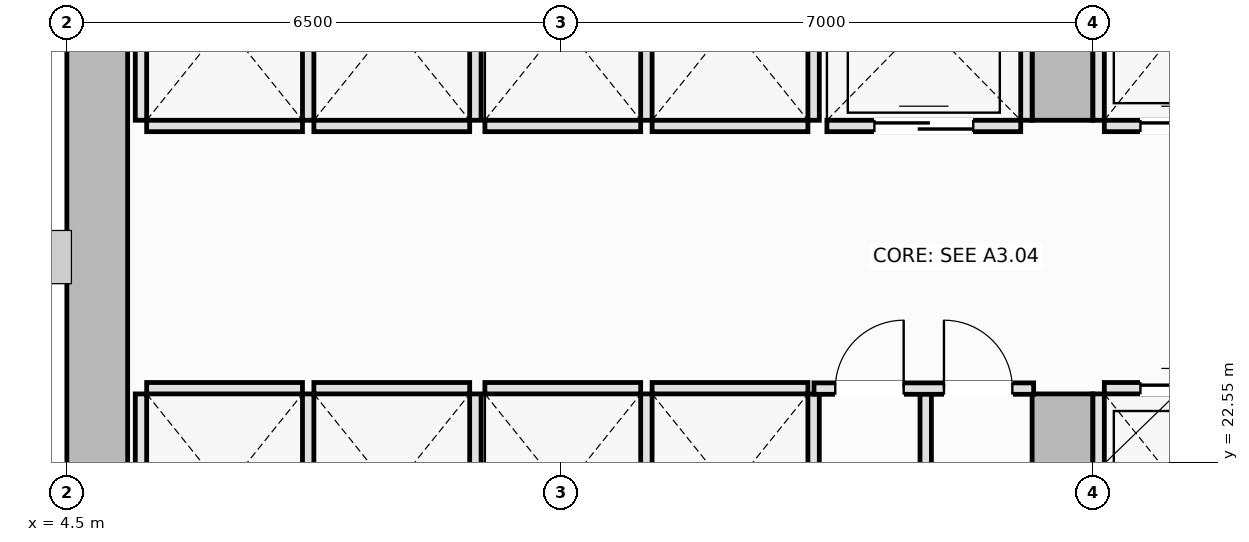
"""IFC4 building model, lengths in metres.
Left out: names, types, materials, properties, quantities, classifications, styles, units other than length and angle.
Written with IfcOpenShell. Run it as: python <this file> out.ifc"""

import sys

from ifc_helpers import new_model, si_unit, direction, frame, frame_2d, origin, place, context, subcontext, project, spatial, rectangle, extrude, element, fill, save


model = new_model("IFC4")
c1 = context("Model", 3, precision=1e-05, world=origin(), true_north=direction((0.0, 1.0)))
c2 = subcontext(c1, "Body", "Model", "MODEL_VIEW")
j1 = project(units=[si_unit("LENGTHUNIT", "METRE"), si_unit("PLANEANGLEUNIT", "RADIAN")], contexts=[c1])
p1 = place(None, origin())
s1 = spatial("IfcSite", under=j1, at=p1, CompositionType="ELEMENT")
p2 = place(p1, origin())
s2 = spatial("IfcBuilding", under=s1, at=p2, CompositionType="ELEMENT")
p3 = place(p2, frame((0.0, 0.0, 68.2)))
s3 = spatial("IfcBuildingStorey", under=s2, at=p3, CompositionType="ELEMENT", Elevation=68.2)
p4 = place(p3, frame((4.9, 14.8, 0.0), z_axis=(0.0, 0.0, 1.0), x_axis=(0.0, 1.0, 0.0)))
e1 = element("IfcWall", 1, at=p4, inside=s3, PredefinedType="SHEAR", context=c2, shape_type="SweptSolid", body=[
    extrude(rectangle(XDim=20.9, YDim=0.8, at=frame_2d((10.45, 0.0))), origin(), (0.0, 0.0, 1.0), 3.55),
])
p5 = place(p3, frame((17.6, 14.8, 0.0), z_axis=(0.0, 0.0, 1.0), x_axis=(0.0, 1.0, 0.0)))
e2 = element("IfcWall", 2, at=p5, inside=s3, PredefinedType="SHEAR", context=c2, shape_type="SweptSolid", body=[
    extrude(rectangle(XDim=8.65, YDim=0.8, at=frame_2d((4.325, 0.0))), origin(), (0.0, 0.0, 1.0), 3.55),
])
p6 = place(p5, frame((4.1, 0.0, 0.0)))
e3 = element("IfcOpeningElement", 3, at=p6, cuts=e2, PredefinedType="OPENING", context=c2, shape_type="SweptSolid", body=[
    extrude(rectangle(XDim=1.1, YDim=2.15, at=frame_2d((0.55, 1.075))), frame((0.0, 0.41, 0.0), z_axis=(0.0, -1.0, 0.0), x_axis=(1.0, 0.0, 0.0)), (0.0, 0.0, 1.0), 0.82),
])
p7 = place(p3, frame((17.6, 27.05, 0.0), z_axis=(0.0, 0.0, 1.0), x_axis=(0.0, 1.0, 0.0)))
e4 = element("IfcWall", 4, at=p7, inside=s3, PredefinedType="SHEAR", context=c2, shape_type="SweptSolid", body=[
    extrude(rectangle(XDim=8.65, YDim=0.8, at=frame_2d((4.325, 0.0))), origin(), (0.0, 0.0, 1.0), 3.55),
])
p8 = place(p7, frame((3.45, 0.0, 0.0)))
e5 = element("IfcOpeningElement", 5, at=p8, cuts=e4, PredefinedType="OPENING", context=c2, shape_type="SweptSolid", body=[
    extrude(rectangle(XDim=1.1, YDim=2.15, at=frame_2d((0.55, 1.075))), frame((0.0, 0.41, 0.0), z_axis=(0.0, -1.0, 0.0), x_axis=(1.0, 0.0, 0.0)), (0.0, 0.0, 1.0), 0.82),
])
p9 = place(p3, frame((18.15, 23.525, 0.0), z_axis=(0.0, 0.0, 1.0), x_axis=(1.0, 0.0, 0.0)))
e6 = element("IfcWall", 6, at=p9, inside=s3, PredefinedType="PARTITIONING", context=c2, shape_type="SweptSolid", body=[
    extrude(rectangle(XDim=2.05, YDim=0.15, at=frame_2d((1.025, 0.0))), origin(), (0.0, 0.0, 1.0), 3.37),
])
p10 = place(p9, frame((0.475, 0.0, 0.0)))
e7 = element("IfcOpeningElement", 7, at=p10, cuts=e6, PredefinedType="OPENING", context=c2, shape_type="SweptSolid", body=[
    extrude(rectangle(XDim=1.1, YDim=2.2, at=frame_2d((0.55, 1.1))), frame((0.0, 0.085, 0.0), z_axis=(0.0, -1.0, 0.0), x_axis=(1.0, 0.0, 0.0)), (0.0, 0.0, 1.0), 0.17),
])
p11 = place(p3, frame((18.075, 20.9, 0.0), z_axis=(0.0, 0.0, 1.0), x_axis=(0.0, 1.0, 0.0)))
e8 = element("IfcWall", 8, at=p11, inside=s3, PredefinedType="PARTITIONING", context=c2, shape_type="SweptSolid", body=[
    extrude(rectangle(XDim=2.55, YDim=0.15, at=frame_2d((1.275, 0.0))), origin(), (0.0, 0.0, 1.0), 3.37),
])
p12 = place(p3, frame((18.15, 26.975, 0.0), z_axis=(0.0, 0.0, 1.0), x_axis=(1.0, 0.0, 0.0)))
e9 = element("IfcWall", 9, at=p12, inside=s3, PredefinedType="PARTITIONING", context=c2, shape_type="SweptSolid", body=[
    extrude(rectangle(XDim=2.05, YDim=0.15, at=frame_2d((1.025, 0.0))), origin(), (0.0, 0.0, 1.0), 3.37),
])
p13 = place(p12, frame((0.475, 0.0, 0.0)))
e10 = element("IfcOpeningElement", 10, at=p13, cuts=e9, PredefinedType="OPENING", context=c2, shape_type="SweptSolid", body=[
    extrude(rectangle(XDim=1.1, YDim=2.2, at=frame_2d((0.55, 1.1))), frame((0.0, 0.085, 0.0), z_axis=(0.0, -1.0, 0.0), x_axis=(1.0, 0.0, 0.0)), (0.0, 0.0, 1.0), 0.17),
])
p14 = place(p3, frame((18.075, 27.05, 0.0), z_axis=(0.0, 0.0, 1.0), x_axis=(0.0, 1.0, 0.0)))
e11 = element("IfcWall", 11, at=p14, inside=s3, PredefinedType="PARTITIONING", context=c2, shape_type="SweptSolid", body=[
    extrude(rectangle(XDim=2.55, YDim=0.15, at=frame_2d((1.275, 0.0))), origin(), (0.0, 0.0, 1.0), 3.37),
])
p15 = place(p3, frame((5.55, 23.525, 0.0), z_axis=(0.0, 0.0, 1.0), x_axis=(1.0, 0.0, 0.0)))
e12 = element("IfcWall", 12, at=p15, inside=s3, PredefinedType="PARTITIONING", context=c2, shape_type="SweptSolid", body=[
    extrude(rectangle(XDim=2.05, YDim=0.15, at=frame_2d((1.025, 0.0))), origin(), (0.0, 0.0, 1.0), 3.37),
])
for number, where, z_axis, x_axis in (
    (13, (5.475, 20.9, 0.0), (0.0, 0.0, 1.0), (0.0, 1.0, 0.0)),
    (14, (7.675, 20.9, 0.0), (0.0, 0.0, 1.0), (0.0, 1.0, 0.0)),
):
    element("IfcWall", number, at=place(p3, frame(where, z_axis=z_axis, x_axis=x_axis)), inside=s3, PredefinedType="PARTITIONING", context=c2, shape_type="SweptSolid", body=[
        extrude(rectangle(XDim=2.55, YDim=0.15, at=frame_2d((1.275, 0.0))), origin(), (0.0, 0.0, 1.0), 3.37),
    ])
p16 = place(p3, frame((7.75, 23.525, 0.0), z_axis=(0.0, 0.0, 1.0), x_axis=(1.0, 0.0, 0.0)))
e15 = element("IfcWall", 15, at=p16, inside=s3, PredefinedType="PARTITIONING", context=c2, shape_type="SweptSolid", body=[
    extrude(rectangle(XDim=2.05, YDim=0.15, at=frame_2d((1.025, 0.0))), origin(), (0.0, 0.0, 1.0), 3.37),
])
p17 = place(p3, frame((9.875, 20.9, 0.0), z_axis=(0.0, 0.0, 1.0), x_axis=(0.0, 1.0, 0.0)))
e16 = element("IfcWall", 16, at=p17, inside=s3, PredefinedType="PARTITIONING", context=c2, shape_type="SweptSolid", body=[
    extrude(rectangle(XDim=2.55, YDim=0.15, at=frame_2d((1.275, 0.0))), origin(), (0.0, 0.0, 1.0), 3.37),
])
p18 = place(p3, frame((5.55, 26.975, 0.0), z_axis=(0.0, 0.0, 1.0), x_axis=(1.0, 0.0, 0.0)))
e17 = element("IfcWall", 17, at=p18, inside=s3, PredefinedType="PARTITIONING", context=c2, shape_type="SweptSolid", body=[
    extrude(rectangle(XDim=2.05, YDim=0.15, at=frame_2d((1.025, 0.0))), origin(), (0.0, 0.0, 1.0), 3.37),
])
for number, where, z_axis, x_axis in (
    (18, (5.475, 27.05, 0.0), (0.0, 0.0, 1.0), (0.0, 1.0, 0.0)),
    (19, (7.675, 27.05, 0.0), (0.0, 0.0, 1.0), (0.0, 1.0, 0.0)),
):
    element("IfcWall", number, at=place(p3, frame(where, z_axis=z_axis, x_axis=x_axis)), inside=s3, PredefinedType="PARTITIONING", context=c2, shape_type="SweptSolid", body=[
        extrude(rectangle(XDim=2.55, YDim=0.15, at=frame_2d((1.275, 0.0))), origin(), (0.0, 0.0, 1.0), 3.37),
    ])
p19 = place(p3, frame((7.75, 26.975, 0.0), z_axis=(0.0, 0.0, 1.0), x_axis=(1.0, 0.0, 0.0)))
e20 = element("IfcWall", 20, at=p19, inside=s3, PredefinedType="PARTITIONING", context=c2, shape_type="SweptSolid", body=[
    extrude(rectangle(XDim=2.05, YDim=0.15, at=frame_2d((1.025, 0.0))), origin(), (0.0, 0.0, 1.0), 3.37),
])
p20 = place(p3, frame((9.875, 27.05, 0.0), z_axis=(0.0, 0.0, 1.0), x_axis=(0.0, 1.0, 0.0)))
e21 = element("IfcWall", 21, at=p20, inside=s3, PredefinedType="PARTITIONING", context=c2, shape_type="SweptSolid", body=[
    extrude(rectangle(XDim=2.55, YDim=0.15, at=frame_2d((1.275, 0.0))), origin(), (0.0, 0.0, 1.0), 3.37),
])
p21 = place(p3, frame((10.0, 23.525, 0.0), z_axis=(0.0, 0.0, 1.0), x_axis=(1.0, 0.0, 0.0)))
e22 = element("IfcWall", 22, at=p21, inside=s3, PredefinedType="PARTITIONING", context=c2, shape_type="SweptSolid", body=[
    extrude(rectangle(XDim=2.05, YDim=0.15, at=frame_2d((1.025, 0.0))), origin(), (0.0, 0.0, 1.0), 3.37),
])
p22 = place(p3, frame((12.125, 20.9, 0.0), z_axis=(0.0, 0.0, 1.0), x_axis=(0.0, 1.0, 0.0)))
e23 = element("IfcWall", 23, at=p22, inside=s3, PredefinedType="PARTITIONING", context=c2, shape_type="SweptSolid", body=[
    extrude(rectangle(XDim=2.55, YDim=0.15, at=frame_2d((1.275, 0.0))), origin(), (0.0, 0.0, 1.0), 3.37),
])
p23 = place(p3, frame((12.2, 23.525, 0.0), z_axis=(0.0, 0.0, 1.0), x_axis=(1.0, 0.0, 0.0)))
e24 = element("IfcWall", 24, at=p23, inside=s3, PredefinedType="PARTITIONING", context=c2, shape_type="SweptSolid", body=[
    extrude(rectangle(XDim=2.05, YDim=0.15, at=frame_2d((1.025, 0.0))), origin(), (0.0, 0.0, 1.0), 3.37),
])
p24 = place(p3, frame((14.325, 20.9, 0.0), z_axis=(0.0, 0.0, 1.0), x_axis=(0.0, 1.0, 0.0)))
e25 = element("IfcWall", 25, at=p24, inside=s3, PredefinedType="PARTITIONING", context=c2, shape_type="SweptSolid", body=[
    extrude(rectangle(XDim=2.55, YDim=0.15, at=frame_2d((1.275, 0.0))), origin(), (0.0, 0.0, 1.0), 3.37),
])
p25 = place(p3, frame((10.0, 26.975, 0.0), z_axis=(0.0, 0.0, 1.0), x_axis=(1.0, 0.0, 0.0)))
e26 = element("IfcWall", 26, at=p25, inside=s3, PredefinedType="PARTITIONING", context=c2, shape_type="SweptSolid", body=[
    extrude(rectangle(XDim=2.05, YDim=0.15, at=frame_2d((1.025, 0.0))), origin(), (0.0, 0.0, 1.0), 3.37),
])
p26 = place(p3, frame((12.125, 27.05, 0.0), z_axis=(0.0, 0.0, 1.0), x_axis=(0.0, 1.0, 0.0)))
e27 = element("IfcWall", 27, at=p26, inside=s3, PredefinedType="PARTITIONING", context=c2, shape_type="SweptSolid", body=[
    extrude(rectangle(XDim=2.55, YDim=0.15, at=frame_2d((1.275, 0.0))), origin(), (0.0, 0.0, 1.0), 3.37),
])
p27 = place(p3, frame((12.2, 26.975, 0.0), z_axis=(0.0, 0.0, 1.0), x_axis=(1.0, 0.0, 0.0)))
e28 = element("IfcWall", 28, at=p27, inside=s3, PredefinedType="PARTITIONING", context=c2, shape_type="SweptSolid", body=[
    extrude(rectangle(XDim=2.05, YDim=0.15, at=frame_2d((1.025, 0.0))), origin(), (0.0, 0.0, 1.0), 3.37),
])
p28 = place(p3, frame((14.325, 27.05, 0.0), z_axis=(0.0, 0.0, 1.0), x_axis=(0.0, 1.0, 0.0)))
e29 = element("IfcWall", 29, at=p28, inside=s3, PredefinedType="PARTITIONING", context=c2, shape_type="SweptSolid", body=[
    extrude(rectangle(XDim=2.55, YDim=0.15, at=frame_2d((1.275, 0.0))), origin(), (0.0, 0.0, 1.0), 3.37),
])
p29 = place(p3, frame((14.5, 26.975, 0.0), z_axis=(0.0, 0.0, 1.0), x_axis=(1.0, 0.0, 0.0)))
e30 = element("IfcWall", 30, at=p29, inside=s3, PredefinedType="PARTITIONING", context=c2, shape_type="SweptSolid", body=[
    extrude(rectangle(XDim=2.55, YDim=0.15, at=frame_2d((1.275, 0.0))), origin(), (0.0, 0.0, 1.0), 3.37),
])
p30 = place(p29, frame((0.625, 0.0, 0.0)))
e31 = element("IfcOpeningElement", 31, at=p30, cuts=e30, PredefinedType="OPENING", context=c2, shape_type="SweptSolid", body=[
    extrude(rectangle(XDim=1.3, YDim=2.2, at=frame_2d((0.65, 1.1))), frame((0.0, 0.085, 0.0), z_axis=(0.0, -1.0, 0.0), x_axis=(1.0, 0.0, 0.0)), (0.0, 0.0, 1.0), 0.17),
])
p31 = place(p3, frame((17.125, 27.05, 0.0), z_axis=(0.0, 0.0, 1.0), x_axis=(0.0, 1.0, 0.0)))
e32 = element("IfcWall", 32, at=p31, inside=s3, PredefinedType="PARTITIONING", context=c2, shape_type="SweptSolid", body=[
    extrude(rectangle(XDim=2.6, YDim=0.15, at=frame_2d((1.3, 0.0))), origin(), (0.0, 0.0, 1.0), 3.37),
])
p32 = place(p3, frame((15.8, 20.85, 0.0), z_axis=(0.0, 0.0, 1.0), x_axis=(0.0, 1.0, 0.0)))
e33 = element("IfcWall", 33, at=p32, inside=s3, PredefinedType="PARTITIONING", context=c2, shape_type="SweptSolid", body=[
    extrude(rectangle(XDim=2.67, YDim=0.15, at=frame_2d((1.335, 0.0))), origin(), (0.0, 0.0, 1.0), 3.37),
])
p33 = place(p3, frame((14.33, 23.52, 0.0), z_axis=(0.0, 0.0, 1.0), x_axis=(1.0, 0.0, 0.0)))
e34 = element("IfcWall", 34, at=p33, inside=s3, PredefinedType="PARTITIONING", context=c2, shape_type="SweptSolid", body=[
    extrude(rectangle(XDim=2.89, YDim=0.15, at=frame_2d((1.445, 0.0))), origin(), (0.0, 0.0, 1.0), 3.37),
])
p34 = place(p33, frame((0.28, 0.0, 0.0)))
e35 = element("IfcOpeningElement", 35, at=p34, cuts=e34, PredefinedType="OPENING", context=c2, shape_type="SweptSolid", body=[
    extrude(rectangle(XDim=0.9, YDim=2.1, at=frame_2d((0.45, 1.05))), frame((0.0, 0.085, 0.0), z_axis=(0.0, -1.0, 0.0), x_axis=(1.0, 0.0, 0.0)), (0.0, 0.0, 1.0), 0.17),
])
p35 = place(p33, frame((1.71, 0.0, 0.0)))
e36 = element("IfcOpeningElement", 36, at=p35, cuts=e34, PredefinedType="OPENING", context=c2, shape_type="SweptSolid", body=[
    extrude(rectangle(XDim=0.9, YDim=2.1, at=frame_2d((0.45, 1.05))), frame((0.0, 0.085, 0.0), z_axis=(0.0, -1.0, 0.0), x_axis=(1.0, 0.0, 0.0)), (0.0, 0.0, 1.0), 0.17),
])
p36 = place(p10, origin())
e37 = element("IfcDoor", 37, at=p36, inside=s3, OperationType="DOUBLE_DOOR_SLIDING", PredefinedType="DOOR", context=c2, shape_type="SweptSolid", body=[
    extrude(rectangle(XDim=1.1, YDim=2.2, at=frame_2d((0.55, 1.1))), frame((0.0, 0.025, 0.0), z_axis=(0.0, -1.0, 0.0), x_axis=(1.0, 0.0, 0.0)), (0.0, 0.0, 1.0), 0.05),
])
fill(e7, e37)
p37 = place(p13, origin())
e38 = element("IfcDoor", 38, at=p37, inside=s3, OperationType="DOUBLE_DOOR_SLIDING", PredefinedType="DOOR", context=c2, shape_type="SweptSolid", body=[
    extrude(rectangle(XDim=1.1, YDim=2.2, at=frame_2d((0.55, 1.1))), frame((0.0, 0.025, 0.0), z_axis=(0.0, -1.0, 0.0), x_axis=(1.0, 0.0, 0.0)), (0.0, 0.0, 1.0), 0.05),
])
fill(e10, e38)
p38 = place(p30, origin())
e39 = element("IfcDoor", 39, at=p38, inside=s3, OperationType="DOUBLE_DOOR_SLIDING", PredefinedType="DOOR", context=c2, shape_type="SweptSolid", body=[
    extrude(rectangle(XDim=1.3, YDim=2.2, at=frame_2d((0.65, 1.1))), frame((0.0, 0.025, 0.0), z_axis=(0.0, -1.0, 0.0), x_axis=(1.0, 0.0, 0.0)), (0.0, 0.0, 1.0), 0.05),
])
fill(e31, e39)
p39 = place(p34, origin())
e40 = element("IfcDoor", 40, at=p39, inside=s3, OperationType="SINGLE_SWING_RIGHT", PredefinedType="DOOR", context=c2, shape_type="SweptSolid", body=[
    extrude(rectangle(XDim=0.9, YDim=2.1, at=frame_2d((0.45, 1.05))), frame((0.0, 0.025, 0.0), z_axis=(0.0, -1.0, 0.0), x_axis=(1.0, 0.0, 0.0)), (0.0, 0.0, 1.0), 0.05),
])
fill(e35, e40)
p40 = place(p35, origin())
e41 = element("IfcDoor", 41, at=p40, inside=s3, OperationType="SINGLE_SWING_LEFT", PredefinedType="DOOR", context=c2, shape_type="SweptSolid", body=[
    extrude(rectangle(XDim=0.9, YDim=2.1, at=frame_2d((0.45, 1.05))), frame((0.0, 0.025, 0.0), z_axis=(0.0, -1.0, 0.0), x_axis=(1.0, 0.0, 0.0)), (0.0, 0.0, 1.0), 0.05),
])
fill(e36, e41)
save(model, sys.argv[1])
